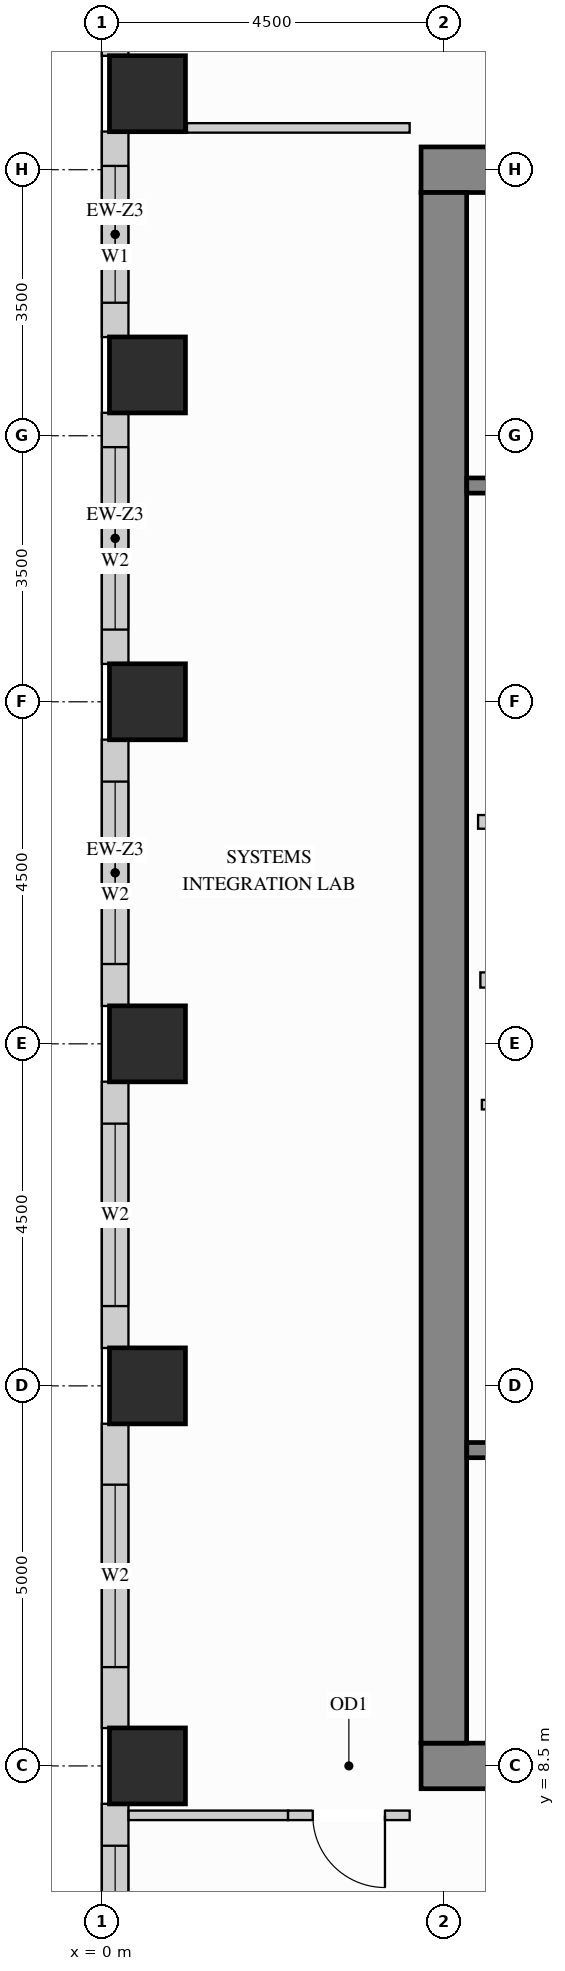
"""IFC4 building model, lengths in metres.
Left out: names, types, materials, properties, quantities, classifications, styles, units other than length and angle.
Written with IfcOpenShell. Run it as: python <this file> out.ifc"""

import sys

from ifc_helpers import new_model, si_unit, direction, frame, frame_2d, origin, origin_2d, place, context, subcontext, project, spatial, rectangle, extrude, source, transform, mapped, element, fill, save


model = new_model("IFC4")
c1 = context("Model", 3, precision=1e-05, world=origin(), true_north=direction((0.0, 1.0)))
c2 = subcontext(c1, "Body", "Model", "MODEL_VIEW")
j1 = project(units=[si_unit("LENGTHUNIT", "METRE"), si_unit("PLANEANGLEUNIT", "RADIAN")], contexts=[c1])
p1 = place(None, origin())
s1 = spatial("IfcSite", under=j1, at=p1, CompositionType="ELEMENT")
p2 = place(p1, origin())
s2 = spatial("IfcBuilding", under=s1, at=p2, CompositionType="ELEMENT")
p3 = place(p2, frame((0.0, 0.0, 193.5)))
s3 = spatial("IfcBuildingStorey", under=s2, at=p3, CompositionType="ELEMENT", Elevation=193.5)
m1 = source(origin(), c2, "Body", "SweptSolid", [
    extrude(rectangle(XDim=1.0, YDim=1.0, at=origin_2d()), origin(), (0.0, 0.0, 1.0), 3.4),
])
for number, where, z_axis, x_axis in (
    (1, (0.6, 13.5, 0.0), (0.0, 0.0, 1.0), (1.0, 0.0, 0.0)),
    (2, (0.6, 18.0, 0.0), (0.0, 0.0, 1.0), (1.0, 0.0, 0.0)),
    (3, (0.6, 22.5, 0.0), (0.0, 0.0, 1.0), (1.0, 0.0, 0.0)),
    (4, (0.6, 26.8, 0.0), (0.0, 0.0, 1.0), (1.0, 0.0, 0.0)),
    (5, (0.6, 30.5, 0.0), (0.0, 0.0, 1.0), (1.0, 0.0, 0.0)),
    (6, (0.6, 8.5, 0.0), (0.0, 0.0, 1.0), (1.0, 0.0, 0.0)),
):
    element("IfcColumn", number, at=place(p3, frame(where, z_axis=z_axis, x_axis=x_axis)), inside=s3, PredefinedType="COLUMN", context=c2, shape_type="MappedRepresentation", body=[
        mapped(m1, transform((0.0, 0.0, 0.0), x_axis=(1.0, 0.0, 0.0), y_axis=(0.0, 1.0, 0.0), z_axis=(0.0, 0.0, 1.0))),
    ])
m2 = source(origin(), c2, "Body", "SweptSolid", [
    extrude(rectangle(XDim=10.6, YDim=0.6, at=frame_2d((5.3, 0.0))), origin(), (0.0, 0.0, 1.0), 3.4),
])
for number, where, z_axis, x_axis in (
    (7, (4.2, 29.5, 0.0), (0.0, 0.0, 1.0), (1.0, 0.0, 0.0)),
    (8, (4.2, 8.5, 0.0), (0.0, 0.0, 1.0), (1.0, 0.0, 0.0)),
):
    element("IfcWall", number, at=place(p3, frame(where, z_axis=z_axis, x_axis=x_axis)), inside=s3, PredefinedType="SHEAR", context=c2, shape_type="MappedRepresentation", body=[
        mapped(m2, transform((0.0, 0.0, 0.0), x_axis=(1.0, 0.0, 0.0), y_axis=(0.0, 1.0, 0.0), z_axis=(0.0, 0.0, 1.0))),
    ])
m3 = source(origin(), c2, "Body", "SweptSolid", [
    extrude(rectangle(XDim=20.4, YDim=0.6, at=frame_2d((10.2, 0.0))), origin(), (0.0, 0.0, 1.0), 3.4),
])
p4 = place(p3, frame((4.5, 8.8, 0.0), z_axis=(0.0, 0.0, 1.0), x_axis=(0.0, 1.0, 0.0)))
e9 = element("IfcWall", 9, at=p4, inside=s3, PredefinedType="SHEAR", context=c2, shape_type="MappedRepresentation", body=[
    mapped(m3, transform((0.0, 0.0, 0.0), x_axis=(1.0, 0.0, 0.0), y_axis=(0.0, 1.0, 0.0), z_axis=(0.0, 0.0, 1.0))),
])
p5 = place(p3, frame((0.175, 34.502, 0.0), z_axis=(0.0, 0.0, 1.0), x_axis=(0.0, -1.0, 0.0)))
e10 = element("IfcWall", 10, at=p5, inside=s3, PredefinedType="SOLIDWALL", context=c2, shape_type="SweptSolid", body=[
    extrude(rectangle(XDim=3.504, YDim=0.35, at=frame_2d((1.752, 0.0))), origin(), (0.0, 0.0, 1.0), 2.612),
])
p6 = place(p5, frame((0.561, 0.0, 0.78)))
e11 = element("IfcOpeningElement", 11, at=p6, cuts=e10, PredefinedType="OPENING", context=c2, shape_type="SweptSolid", body=[
    extrude(rectangle(XDim=1.8, YDim=1.652, at=frame_2d((0.9, 0.826))), frame((0.0, 0.185, 0.0), z_axis=(0.0, -1.0, 0.0), x_axis=(1.0, 0.0, 0.0)), (0.0, 0.0, 1.0), 0.37),
])
p7 = place(p3, frame((0.175, 30.002, 0.0), z_axis=(0.0, 0.0, 1.0), x_axis=(0.0, -1.0, 0.0)))
e12 = element("IfcWall", 12, at=p7, inside=s3, PredefinedType="SOLIDWALL", context=c2, shape_type="SweptSolid", body=[
    extrude(rectangle(XDim=2.704, YDim=0.35, at=frame_2d((1.352, 0.0))), origin(), (0.0, 0.0, 1.0), 2.612),
])
p8 = place(p7, frame((0.452, 0.0, 0.78)))
e13 = element("IfcOpeningElement", 13, at=p8, cuts=e12, PredefinedType="OPENING", context=c2, shape_type="SweptSolid", body=[
    extrude(rectangle(XDim=1.8, YDim=1.652, at=frame_2d((0.9, 0.826))), frame((0.0, 0.185, 0.0), z_axis=(0.0, -1.0, 0.0), x_axis=(1.0, 0.0, 0.0)), (0.0, 0.0, 1.0), 0.37),
])
p9 = place(p3, frame((0.175, 26.302, 0.0), z_axis=(0.0, 0.0, 1.0), x_axis=(0.0, -1.0, 0.0)))
e14 = element("IfcWall", 14, at=p9, inside=s3, PredefinedType="SOLIDWALL", context=c2, shape_type="SweptSolid", body=[
    extrude(rectangle(XDim=3.304, YDim=0.35, at=frame_2d((1.652, 0.0))), origin(), (0.0, 0.0, 1.0), 2.612),
])
p10 = place(p9, frame((0.452, 0.0, 0.78)))
e15 = element("IfcOpeningElement", 15, at=p10, cuts=e14, PredefinedType="OPENING", context=c2, shape_type="SweptSolid", body=[
    extrude(rectangle(XDim=2.4, YDim=1.652, at=frame_2d((1.2, 0.826))), frame((0.0, 0.185, 0.0), z_axis=(0.0, -1.0, 0.0), x_axis=(1.0, 0.0, 0.0)), (0.0, 0.0, 1.0), 0.37),
])
p11 = place(p3, frame((0.175, 22.002, 0.0), z_axis=(0.0, 0.0, 1.0), x_axis=(0.0, -1.0, 0.0)))
e16 = element("IfcWall", 16, at=p11, inside=s3, PredefinedType="SOLIDWALL", context=c2, shape_type="SweptSolid", body=[
    extrude(rectangle(XDim=3.504, YDim=0.35, at=frame_2d((1.752, 0.0))), origin(), (0.0, 0.0, 1.0), 2.612),
])
p12 = place(p11, frame((0.552, 0.0, 0.78)))
e17 = element("IfcOpeningElement", 17, at=p12, cuts=e16, PredefinedType="OPENING", context=c2, shape_type="SweptSolid", body=[
    extrude(rectangle(XDim=2.4, YDim=1.652, at=frame_2d((1.2, 0.826))), frame((0.0, 0.185, 0.0), z_axis=(0.0, -1.0, 0.0), x_axis=(1.0, 0.0, 0.0)), (0.0, 0.0, 1.0), 0.37),
])
p13 = place(p3, frame((0.175, 17.502, 0.0), z_axis=(0.0, 0.0, 1.0), x_axis=(0.0, -1.0, 0.0)))
e18 = element("IfcWall", 18, at=p13, inside=s3, PredefinedType="SOLIDWALL", context=c2, shape_type="SweptSolid", body=[
    extrude(rectangle(XDim=3.504, YDim=0.35, at=frame_2d((1.752, 0.0))), origin(), (0.0, 0.0, 1.0), 2.612),
])
p14 = place(p13, frame((0.552, 0.0, 0.78)))
e19 = element("IfcOpeningElement", 19, at=p14, cuts=e18, PredefinedType="OPENING", context=c2, shape_type="SweptSolid", body=[
    extrude(rectangle(XDim=2.4, YDim=1.652, at=frame_2d((1.2, 0.826))), frame((0.0, 0.185, 0.0), z_axis=(0.0, -1.0, 0.0), x_axis=(1.0, 0.0, 0.0)), (0.0, 0.0, 1.0), 0.37),
])
p15 = place(p3, frame((0.175, 13.002, 0.0), z_axis=(0.0, 0.0, 1.0), x_axis=(0.0, -1.0, 0.0)))
e20 = element("IfcWall", 20, at=p15, inside=s3, PredefinedType="SOLIDWALL", context=c2, shape_type="SweptSolid", body=[
    extrude(rectangle(XDim=4.004, YDim=0.35, at=frame_2d((2.002, 0.0))), origin(), (0.0, 0.0, 1.0), 2.612),
])
p16 = place(p15, frame((0.802, 0.0, 0.78)))
e21 = element("IfcOpeningElement", 21, at=p16, cuts=e20, PredefinedType="OPENING", context=c2, shape_type="SweptSolid", body=[
    extrude(rectangle(XDim=2.4, YDim=1.652, at=frame_2d((1.2, 0.826))), frame((0.0, 0.185, 0.0), z_axis=(0.0, -1.0, 0.0), x_axis=(1.0, 0.0, 0.0)), (0.0, 0.0, 1.0), 0.37),
])
p17 = place(p3, frame((0.175, 8.002, 0.0), z_axis=(0.0, 0.0, 1.0), x_axis=(0.0, -1.0, 0.0)))
e22 = element("IfcWall", 22, at=p17, inside=s3, PredefinedType="SOLIDWALL", context=c2, shape_type="SweptSolid", body=[
    extrude(rectangle(XDim=4.004, YDim=0.35, at=frame_2d((2.002, 0.0))), origin(), (0.0, 0.0, 1.0), 2.612),
])
p18 = place(p17, frame((0.552, 0.0, 0.78)))
e23 = element("IfcOpeningElement", 23, at=p18, cuts=e22, PredefinedType="OPENING", context=c2, shape_type="SweptSolid", body=[
    extrude(rectangle(XDim=2.4, YDim=1.652, at=frame_2d((1.2, 0.826))), frame((0.0, 0.185, 0.0), z_axis=(0.0, -1.0, 0.0), x_axis=(1.0, 0.0, 0.0)), (0.0, 0.0, 1.0), 0.37),
])
m4 = source(origin(), c2, "Body", "SweptSolid", [
    extrude(rectangle(XDim=2.2, YDim=0.18, at=frame_2d((1.1, 0.0))), origin(), (0.0, 0.0, 1.0), 3.385),
])
p19 = place(p3, frame((4.95, 20.92, 0.0), z_axis=(0.0, 0.0, 1.0), x_axis=(1.0, 0.0, 0.0)))
e24 = element("IfcWall", 24, at=p19, inside=s3, PredefinedType="PARTITIONING", context=c2, shape_type="MappedRepresentation", body=[
    mapped(m4, transform((0.0, 0.0, 0.0), x_axis=(1.0, 0.0, 0.0), y_axis=(0.0, 1.0, 0.0), z_axis=(0.0, 0.0, 1.0))),
])
p20 = place(p3, frame((5.0, 17.2, 0.0), z_axis=(0.0, 0.0, 1.0), x_axis=(1.0, 0.0, 0.0)))
e25 = element("IfcWall", 25, at=p20, inside=s3, PredefinedType="PARTITIONING", context=c2, shape_type="SweptSolid", body=[
    extrude(rectangle(XDim=2.4, YDim=0.125, at=frame_2d((1.2, 0.0))), origin(), (0.0, 0.0, 1.0), 3.385),
])
p21 = place(p20, frame((0.7, 0.0, 0.0)))
e26 = element("IfcOpeningElement", 26, at=p21, cuts=e25, PredefinedType="OPENING", context=c2, shape_type="SweptSolid", body=[
    extrude(rectangle(XDim=0.85, YDim=2.1, at=frame_2d((0.425, 1.05))), frame((0.0, 0.073, 0.0), z_axis=(0.0, -1.0, 0.0), x_axis=(1.0, 0.0, 0.0)), (0.0, 0.0, 1.0), 0.145),
])
m5 = source(origin(), c2, "Body", "SweptSolid", [
    extrude(rectangle(XDim=2.93, YDim=0.125, at=frame_2d((1.465, 0.0))), origin(), (0.0, 0.0, 1.0), 3.385),
])
p22 = place(p3, frame((1.12, 30.05, 0.0), z_axis=(0.0, 0.0, 1.0), x_axis=(1.0, 0.0, 0.0)))
e27 = element("IfcWall", 27, at=p22, inside=s3, PredefinedType="PARTITIONING", context=c2, shape_type="MappedRepresentation", body=[
    mapped(m5, transform((0.0, 0.0, 0.0), x_axis=(1.0, 0.0, 0.0), y_axis=(0.0, 1.0, 0.0), z_axis=(0.0, 0.0, 1.0))),
])
m6 = source(origin(), c2, "Body", "SweptSolid", [
    extrude(rectangle(XDim=2.098, YDim=0.125, at=frame_2d((1.049, 0.0))), origin(), (0.0, 0.0, 1.0), 3.385),
])
p23 = place(p3, frame((0.352, 7.85, 0.0), z_axis=(0.0, 0.0, 1.0), x_axis=(1.0, 0.0, 0.0)))
e28 = element("IfcWall", 28, at=p23, inside=s3, PredefinedType="PARTITIONING", context=c2, shape_type="MappedRepresentation", body=[
    mapped(m6, transform((0.0, 0.0, 0.0), x_axis=(1.0, 0.0, 0.0), y_axis=(0.0, 1.0, 0.0), z_axis=(0.0, 0.0, 1.0))),
])
p24 = place(p3, frame((2.45, 7.85, 0.0), z_axis=(0.0, 0.0, 1.0), x_axis=(1.0, 0.0, 0.0)))
e29 = element("IfcWall", 29, at=p24, inside=s3, PredefinedType="PARTITIONING", context=c2, shape_type="SweptSolid", body=[
    extrude(rectangle(XDim=1.6, YDim=0.125, at=frame_2d((0.8, 0.0))), origin(), (0.0, 0.0, 1.0), 3.385),
])
p25 = place(p24, frame((0.325, 0.0, 0.0)))
e30 = element("IfcOpeningElement", 30, at=p25, cuts=e29, PredefinedType="OPENING", context=c2, shape_type="SweptSolid", body=[
    extrude(rectangle(XDim=0.95, YDim=2.15, at=frame_2d((0.475, 1.075))), frame((0.0, 0.073, 0.0), z_axis=(0.0, -1.0, 0.0), x_axis=(1.0, 0.0, 0.0)), (0.0, 0.0, 1.0), 0.145),
])
m7 = source(origin(), c2, "Body", "SweptSolid", [
    extrude(rectangle(XDim=2.09, YDim=0.2, at=frame_2d((1.045, 0.0))), origin(), (0.0, 0.0, 1.0), 3.385),
])
p26 = place(p3, frame((4.98, 18.84, 0.0), z_axis=(0.0, 0.0, 1.0), x_axis=(1.0, 0.0, 0.0)))
e31 = element("IfcWall", 31, at=p26, inside=s3, PredefinedType="PARTITIONING", context=c2, shape_type="MappedRepresentation", body=[
    mapped(m7, transform((0.0, 0.0, 0.0), x_axis=(1.0, 0.0, 0.0), y_axis=(0.0, 1.0, 0.0), z_axis=(0.0, 0.0, 1.0))),
])
p27 = place(p3, frame((4.802, 12.655, 0.0), z_axis=(0.0, 0.0, 1.0), x_axis=(1.0, 0.0, 0.0)))
e32 = element("IfcWall", 32, at=p27, inside=s3, PredefinedType="SHEAR", context=c2, shape_type="SweptSolid", body=[
    extrude(rectangle(XDim=7.603, YDim=0.2, at=frame_2d((3.802, 0.0))), origin(), (0.0, 0.0, 1.0), 3.4),
])
p28 = place(p27, frame((0.4, 0.0, 0.0)))
e33 = element("IfcOpeningElement", 33, at=p28, cuts=e32, PredefinedType="OPENING", context=c2, shape_type="SweptSolid", body=[
    extrude(rectangle(XDim=1.1, YDim=2.15, at=frame_2d((0.55, 1.075))), frame((0.0, 0.11, 0.0), z_axis=(0.0, -1.0, 0.0), x_axis=(1.0, 0.0, 0.0)), (0.0, 0.0, 1.0), 0.22),
])
p29 = place(p3, frame((4.802, 25.345, 0.0), z_axis=(0.0, 0.0, 1.0), x_axis=(1.0, 0.0, 0.0)))
e34 = element("IfcWall", 34, at=p29, inside=s3, PredefinedType="SHEAR", context=c2, shape_type="SweptSolid", body=[
    extrude(rectangle(XDim=7.603, YDim=0.2, at=frame_2d((3.802, 0.0))), origin(), (0.0, 0.0, 1.0), 3.4),
])
p30 = place(p29, frame((0.4, 0.0, 0.0)))
e35 = element("IfcOpeningElement", 35, at=p30, cuts=e34, PredefinedType="OPENING", context=c2, shape_type="SweptSolid", body=[
    extrude(rectangle(XDim=1.1, YDim=2.15, at=frame_2d((0.55, 1.075))), frame((0.0, 0.11, 0.0), z_axis=(0.0, -1.0, 0.0), x_axis=(1.0, 0.0, 0.0)), (0.0, 0.0, 1.0), 0.22),
])
m8 = source(origin(), c2, "Body", "SweptSolid", [
    extrude(rectangle(XDim=0.95, YDim=2.15, at=frame_2d((0.475, 1.075))), frame((0.0, 0.025, 0.0), z_axis=(0.0, -1.0, 0.0), x_axis=(1.0, 0.0, 0.0)), (0.0, 0.0, 1.0), 0.05),
])
p31 = place(p25, origin())
e36 = element("IfcDoor", 36, at=p31, inside=s3, OperationType="SINGLE_SWING_RIGHT", PredefinedType="DOOR", context=c2, shape_type="MappedRepresentation", body=[
    mapped(m8, transform((0.0, 0.0, 0.0), x_axis=(1.0, 0.0, 0.0), y_axis=(0.0, 1.0, 0.0), z_axis=(0.0, 0.0, 1.0))),
])
fill(e30, e36)
m9 = source(origin(), c2, "Body", "SweptSolid", [
    extrude(rectangle(XDim=1.8, YDim=1.652, at=frame_2d((0.9, 0.826))), frame((0.0, 0.03, 0.0), z_axis=(0.0, -1.0, 0.0), x_axis=(1.0, 0.0, 0.0)), (0.0, 0.0, 1.0), 0.06),
])
p32 = place(p8, origin())
e37 = element("IfcWindow", 37, at=p32, inside=s3, PartitioningType="SINGLE_PANEL", PredefinedType="WINDOW", context=c2, shape_type="MappedRepresentation", body=[
    mapped(m9, transform((0.0, 0.0, 0.0), x_axis=(1.0, 0.0, 0.0), y_axis=(0.0, 1.0, 0.0), z_axis=(0.0, 0.0, 1.0))),
])
fill(e13, e37)
m10 = source(origin(), c2, "Body", "SweptSolid", [
    extrude(rectangle(XDim=2.4, YDim=1.652, at=frame_2d((1.2, 0.826))), frame((0.0, 0.03, 0.0), z_axis=(0.0, -1.0, 0.0), x_axis=(1.0, 0.0, 0.0)), (0.0, 0.0, 1.0), 0.06),
])
p33 = place(p10, origin())
e38 = element("IfcWindow", 38, at=p33, inside=s3, PartitioningType="SINGLE_PANEL", PredefinedType="WINDOW", context=c2, shape_type="MappedRepresentation", body=[
    mapped(m10, transform((0.0, 0.0, 0.0), x_axis=(1.0, 0.0, 0.0), y_axis=(0.0, 1.0, 0.0), z_axis=(0.0, 0.0, 1.0))),
])
fill(e15, e38)
p34 = place(p12, origin())
e39 = element("IfcWindow", 39, at=p34, inside=s3, PartitioningType="SINGLE_PANEL", PredefinedType="WINDOW", context=c2, shape_type="MappedRepresentation", body=[
    mapped(m10, transform((0.0, 0.0, 0.0), x_axis=(1.0, 0.0, 0.0), y_axis=(0.0, 1.0, 0.0), z_axis=(0.0, 0.0, 1.0))),
])
fill(e17, e39)
p35 = place(p14, origin())
e40 = element("IfcWindow", 40, at=p35, inside=s3, PartitioningType="SINGLE_PANEL", PredefinedType="WINDOW", context=c2, shape_type="MappedRepresentation", body=[
    mapped(m10, transform((0.0, 0.0, 0.0), x_axis=(1.0, 0.0, 0.0), y_axis=(0.0, 1.0, 0.0), z_axis=(0.0, 0.0, 1.0))),
])
fill(e19, e40)
p36 = place(p16, origin())
e41 = element("IfcWindow", 41, at=p36, inside=s3, PartitioningType="SINGLE_PANEL", PredefinedType="WINDOW", context=c2, shape_type="MappedRepresentation", body=[
    mapped(m10, transform((0.0, 0.0, 0.0), x_axis=(1.0, 0.0, 0.0), y_axis=(0.0, 1.0, 0.0), z_axis=(0.0, 0.0, 1.0))),
])
fill(e21, e41)
p37 = place(p18, origin())
e42 = element("IfcWindow", 42, at=p37, inside=s3, PartitioningType="SINGLE_PANEL", PredefinedType="WINDOW", context=c2, shape_type="MappedRepresentation", body=[
    mapped(m10, transform((0.0, 0.0, 0.0), x_axis=(1.0, 0.0, 0.0), y_axis=(0.0, 1.0, 0.0), z_axis=(0.0, 0.0, 1.0))),
])
fill(e23, e42)
save(model, sys.argv[1])
